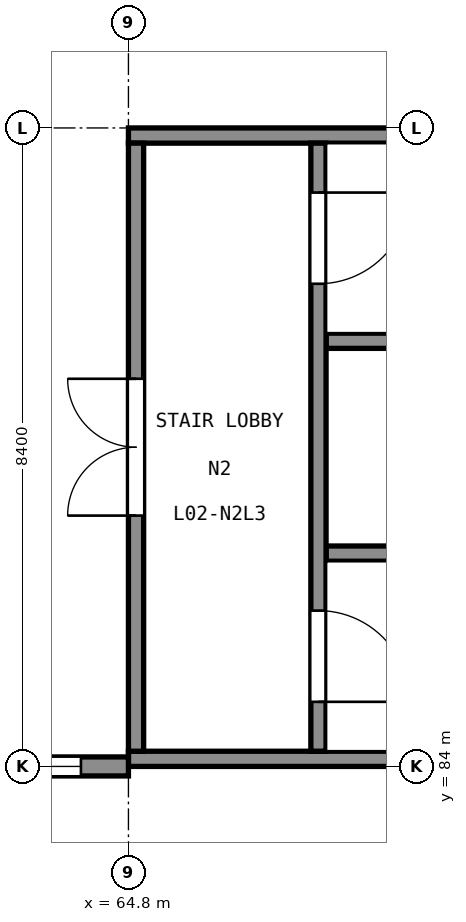
"""IFC4 building model, lengths in metres.
Left out: names, types, materials, properties, quantities, classifications, styles, units other than length and angle.
Written with IfcOpenShell. Run it as: python <this file> out.ifc"""

import sys

from ifc_helpers import new_model, si_unit, direction, frame, frame_2d, origin, place, context, subcontext, project, spatial, rectangle, extrude, element, fill, save


model = new_model("IFC4")
c1 = context("Model", 3, precision=1e-05, world=origin(), true_north=direction((0.0, 1.0)))
c2 = subcontext(c1, "Body", "Model", "MODEL_VIEW")
j1 = project(units=[si_unit("LENGTHUNIT", "METRE"), si_unit("PLANEANGLEUNIT", "RADIAN")], contexts=[c1])
p1 = place(None, origin())
s1 = spatial("IfcSite", under=j1, at=p1, CompositionType="ELEMENT")
p2 = place(p1, origin())
s2 = spatial("IfcBuilding", under=s1, at=p2, CompositionType="ELEMENT")
p3 = place(p2, frame((0.0, 0.0, 10.5)))
s3 = spatial("IfcBuildingStorey", under=s2, at=p3, CompositionType="ELEMENT", Elevation=10.5)
for number, where, z_axis, x_axis in (
    (1, (64.8, 84.1, 0.0), (0.0, 0.0, 1.0), (1.0, 0.0, 0.0)),
    (2, (64.8, 92.3, 0.0), (0.0, 0.0, 1.0), (1.0, 0.0, 0.0)),
):
    element("IfcWall", number, at=place(p3, frame(where, z_axis=z_axis, x_axis=x_axis)), inside=s3, PredefinedType="SHEAR", context=c2, shape_type="SweptSolid", body=[
        extrude(rectangle(XDim=8.4, YDim=0.2, at=frame_2d((4.2, 0.0))), origin(), (0.0, 0.0, 1.0), 9.5),
    ])
p4 = place(p3, frame((64.9, 84.2, 0.0), z_axis=(0.0, 0.0, 1.0), x_axis=(0.0, 1.0, 0.0)))
e3 = element("IfcWall", 3, at=p4, inside=s3, PredefinedType="SHEAR", context=c2, shape_type="SweptSolid", body=[
    extrude(rectangle(XDim=8.0, YDim=0.2, at=frame_2d((4.0, 0.0))), origin(), (0.0, 0.0, 1.0), 9.5),
])
p5 = place(p4, frame((3.1, 0.0, 0.0)))
e4 = element("IfcOpeningElement", 4, at=p5, cuts=e3, PredefinedType="OPENING", context=c2, shape_type="SweptSolid", body=[
    extrude(rectangle(XDim=1.8, YDim=2.1, at=frame_2d((0.9, 1.05))), frame((0.0, 0.11, 0.0), z_axis=(0.0, -1.0, 0.0), x_axis=(1.0, 0.0, 0.0)), (0.0, 0.0, 1.0), 0.22),
])
p6 = place(p3, frame((67.3, 84.2, 0.0), z_axis=(0.0, 0.0, 1.0), x_axis=(0.0, 1.0, 0.0)))
e5 = element("IfcWall", 5, at=p6, inside=s3, PredefinedType="SHEAR", context=c2, shape_type="SweptSolid", body=[
    extrude(rectangle(XDim=8.0, YDim=0.2, at=frame_2d((4.0, 0.0))), origin(), (0.0, 0.0, 1.0), 9.5),
])
p7 = place(p6, frame((0.65, 0.0, 0.0)))
e6 = element("IfcOpeningElement", 6, at=p7, cuts=e5, PredefinedType="OPENING", context=c2, shape_type="SweptSolid", body=[
    extrude(rectangle(XDim=1.2, YDim=2.1, at=frame_2d((0.6, 1.05))), frame((0.0, 0.11, 0.0), z_axis=(0.0, -1.0, 0.0), x_axis=(1.0, 0.0, 0.0)), (0.0, 0.0, 1.0), 0.22),
])
p8 = place(p6, frame((6.15, 0.0, 0.0)))
e7 = element("IfcOpeningElement", 7, at=p8, cuts=e5, PredefinedType="OPENING", context=c2, shape_type="SweptSolid", body=[
    extrude(rectangle(XDim=1.2, YDim=2.1, at=frame_2d((0.6, 1.05))), frame((0.0, 0.11, 0.0), z_axis=(0.0, -1.0, 0.0), x_axis=(1.0, 0.0, 0.0)), (0.0, 0.0, 1.0), 0.22),
])
for number, where, z_axis, x_axis in (
    (8, (67.4, 86.8, 0.0), (0.0, 0.0, 1.0), (1.0, 0.0, 0.0)),
    (9, (67.4, 89.6, 0.0), (0.0, 0.0, 1.0), (1.0, 0.0, 0.0)),
):
    element("IfcWall", number, at=place(p3, frame(where, z_axis=z_axis, x_axis=x_axis)), inside=s3, PredefinedType="SHEAR", context=c2, shape_type="SweptSolid", body=[
        extrude(rectangle(XDim=5.6, YDim=0.2, at=frame_2d((2.8, 0.0))), origin(), (0.0, 0.0, 1.0), 9.5),
    ])
p9 = place(p3, frame((56.75, 84.0, 0.0), z_axis=(0.0, 0.0, 1.0), x_axis=(1.0, 0.0, 0.0)))
e10 = element("IfcWall", 10, at=p9, inside=s3, PredefinedType="SOLIDWALL", context=c2, shape_type="SweptSolid", body=[
    extrude(rectangle(XDim=8.05, YDim=0.25, at=frame_2d((4.025, 0.0))), origin(), (0.0, 0.0, 1.0), 8.44),
])
p10 = place(p9, frame((0.625, 0.0, 0.9)))
e11 = element("IfcOpeningElement", 11, at=p10, cuts=e10, PredefinedType="OPENING", context=c2, shape_type="SweptSolid", body=[
    extrude(rectangle(XDim=1.2, YDim=6.0, at=frame_2d((0.6, 3.0))), frame((0.0, 0.135, 0.0), z_axis=(0.0, -1.0, 0.0), x_axis=(1.0, 0.0, 0.0)), (0.0, 0.0, 1.0), 0.27),
])
p11 = place(p9, frame((3.425, 0.0, 0.9)))
e12 = element("IfcOpeningElement", 12, at=p11, cuts=e10, PredefinedType="OPENING", context=c2, shape_type="SweptSolid", body=[
    extrude(rectangle(XDim=1.2, YDim=6.0, at=frame_2d((0.6, 3.0))), frame((0.0, 0.135, 0.0), z_axis=(0.0, -1.0, 0.0), x_axis=(1.0, 0.0, 0.0)), (0.0, 0.0, 1.0), 0.27),
])
p12 = place(p9, frame((6.225, 0.0, 0.9)))
e13 = element("IfcOpeningElement", 13, at=p12, cuts=e10, PredefinedType="OPENING", context=c2, shape_type="SweptSolid", body=[
    extrude(rectangle(XDim=1.2, YDim=6.0, at=frame_2d((0.6, 3.0))), frame((0.0, 0.135, 0.0), z_axis=(0.0, -1.0, 0.0), x_axis=(1.0, 0.0, 0.0)), (0.0, 0.0, 1.0), 0.27),
])
p13 = place(p12, origin())
e14 = element("IfcWindow", 14, at=p13, inside=s3, PartitioningType="SINGLE_PANEL", PredefinedType="WINDOW", context=c2, shape_type="SweptSolid", body=[
    extrude(rectangle(XDim=1.2, YDim=6.0, at=frame_2d((0.6, 3.0))), frame((0.0, 0.105, 0.0), z_axis=(0.0, -1.0, 0.0), x_axis=(1.0, 0.0, 0.0)), (0.0, 0.0, 1.0), 0.06),
])
fill(e13, e14)
p14 = place(p5, origin())
e15 = element("IfcDoor", 15, at=p14, inside=s3, OperationType="DOUBLE_DOOR_SINGLE_SWING", PredefinedType="DOOR", context=c2, shape_type="SweptSolid", body=[
    extrude(rectangle(XDim=1.8, YDim=2.1, at=frame_2d((0.9, 1.05))), frame((0.0, 0.025, 0.0), z_axis=(0.0, -1.0, 0.0), x_axis=(1.0, 0.0, 0.0)), (0.0, 0.0, 1.0), 0.05),
])
fill(e4, e15)
p15 = place(p7, origin())
e16 = element("IfcDoor", 16, at=p15, inside=s3, OperationType="SINGLE_SWING_LEFT", PredefinedType="DOOR", context=c2, shape_type="SweptSolid", body=[
    extrude(rectangle(XDim=1.2, YDim=2.1, at=frame_2d((0.6, 1.05))), frame((0.0, 0.025, 0.0), z_axis=(0.0, -1.0, 0.0), x_axis=(1.0, 0.0, 0.0)), (0.0, 0.0, 1.0), 0.05),
])
fill(e6, e16)
p16 = place(p8, origin())
e17 = element("IfcDoor", 17, at=p16, inside=s3, OperationType="SINGLE_SWING_RIGHT", PredefinedType="DOOR", context=c2, shape_type="SweptSolid", body=[
    extrude(rectangle(XDim=1.2, YDim=2.1, at=frame_2d((0.6, 1.05))), frame((0.0, 0.025, 0.0), z_axis=(0.0, -1.0, 0.0), x_axis=(1.0, 0.0, 0.0)), (0.0, 0.0, 1.0), 0.05),
])
fill(e7, e17)
save(model, sys.argv[1])
